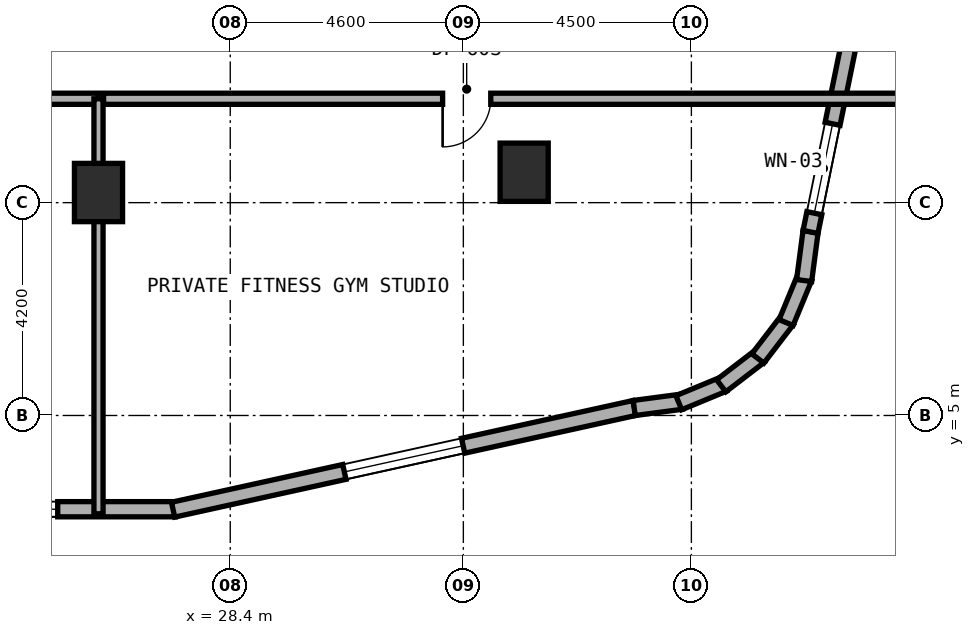
"""IFC4 building model, lengths in metres.
Left out: names, types, materials, properties, quantities, classifications, styles, units other than length and angle.
Written with IfcOpenShell. Run it as: python <this file> out.ifc"""

import sys

from ifc_helpers import new_model, si_unit, direction, frame, frame_2d, origin, origin_2d, place, context, subcontext, project, spatial, rectangle, extrude, element, fill, save


model = new_model("IFC4")
c1 = context("Model", 3, precision=1e-05, world=origin(), true_north=direction((0.0, 1.0)))
c2 = subcontext(c1, "Body", "Model", "MODEL_VIEW")
j1 = project(units=[si_unit("LENGTHUNIT", "METRE"), si_unit("PLANEANGLEUNIT", "RADIAN")], contexts=[c1])
p1 = place(None, origin())
s1 = spatial("IfcSite", under=j1, at=p1, CompositionType="ELEMENT")
p2 = place(p1, origin())
s2 = spatial("IfcBuilding", under=s1, at=p2, CompositionType="ELEMENT")
p3 = place(p2, frame((0.0, 0.0, 69.5)))
s3 = spatial("IfcBuildingStorey", under=s2, at=p3, CompositionType="ELEMENT", Elevation=69.5)
for number, where, z_axis, x_axis in (
    (1, (25.8, 9.4, 0.0), (0.0, 0.0, 1.0), (1.0, 0.0, 0.0)),
    (2, (34.2, 9.8, 0.0), (0.0, 0.0, 1.0), (1.0, 0.0, 0.0)),
):
    element("IfcColumn", number, at=place(p3, frame(where, z_axis=z_axis, x_axis=x_axis)), inside=s3, PredefinedType="COLUMN", context=c2, shape_type="SweptSolid", body=[
        extrude(rectangle(XDim=0.95, YDim=1.15, at=origin_2d()), origin(), (0.0, 0.0, 1.0), 3.5),
    ])
p4 = place(p3, frame((14.727, 3.15, 0.0), z_axis=(0.0, 0.0, 1.0), x_axis=(1.0, 0.0, 0.0)))
e3 = element("IfcWall", 3, at=p4, inside=s3, PredefinedType="STANDARD", context=c2, shape_type="SweptSolid", body=[
    extrude(rectangle(XDim=12.591, YDim=0.3, at=frame_2d((6.295, 0.0))), origin(), (0.0, 0.0, 1.0), 3.22),
])
p5 = place(p4, frame((5.713, 0.0, 0.0)))
e4 = element("IfcOpeningElement", 4, at=p5, cuts=e3, PredefinedType="OPENING", context=c2, shape_type="SweptSolid", body=[
    extrude(rectangle(XDim=1.2, YDim=2.15, at=frame_2d((0.6, 1.075))), frame((0.0, 0.16, 0.0), z_axis=(0.0, -1.0, 0.0), x_axis=(1.0, 0.0, 0.0)), (0.0, 0.0, 1.0), 0.32),
])
p6 = place(p4, frame((2.318, 0.0, 0.8)))
e5 = element("IfcOpeningElement", 5, at=p6, cuts=e3, PredefinedType="OPENING", context=c2, shape_type="SweptSolid", body=[
    extrude(rectangle(XDim=2.4, YDim=1.6, at=frame_2d((1.2, 0.8))), frame((0.0, 0.16, 0.0), z_axis=(0.0, -1.0, 0.0), x_axis=(1.0, 0.0, 0.0)), (0.0, 0.0, 1.0), 0.32),
])
p7 = place(p4, frame((7.868, 0.0, 0.8)))
e6 = element("IfcOpeningElement", 6, at=p7, cuts=e3, PredefinedType="OPENING", context=c2, shape_type="SweptSolid", body=[
    extrude(rectangle(XDim=2.4, YDim=1.6, at=frame_2d((1.2, 0.8))), frame((0.0, 0.16, 0.0), z_axis=(0.0, -1.0, 0.0), x_axis=(1.0, 0.0, 0.0)), (0.0, 0.0, 1.0), 0.32),
])
p8 = place(p3, frame((27.272, 3.141, 0.0), z_axis=(0.0, 0.0, 1.0), x_axis=(0.976555357219, 0.21526642629, 0.0)))
e7 = element("IfcWall", 7, at=p8, inside=s3, PredefinedType="STANDARD", context=c2, shape_type="SweptSolid", body=[
    extrude(rectangle(XDim=9.323, YDim=0.3, at=frame_2d((4.661, 0.0))), origin(), (0.0, 0.0, 1.0), 3.22),
])
p9 = place(p8, frame((3.461, 0.0, 0.8)))
e8 = element("IfcOpeningElement", 8, at=p9, cuts=e7, PredefinedType="OPENING", context=c2, shape_type="SweptSolid", body=[
    extrude(rectangle(XDim=2.4, YDim=1.6, at=frame_2d((1.2, 0.8))), frame((0.0, 0.16, 0.0), z_axis=(0.0, -1.0, 0.0), x_axis=(1.0, 0.0, 0.0)), (0.0, 0.0, 1.0), 0.32),
])
p10 = place(p3, frame((36.372, 5.148, 0.0), z_axis=(0.0, 0.0, 1.0), x_axis=(0.991359246108, 0.131174864804, 0.0)))
e9 = element("IfcWall", 9, at=p10, inside=s3, PredefinedType="STANDARD", context=c2, shape_type="SweptSolid", body=[
    extrude(rectangle(XDim=0.938, YDim=0.3, at=frame_2d((0.469, 0.0))), origin(), (0.0, 0.0, 1.0), 3.22),
])
p11 = place(p3, frame((37.252, 5.252, 0.0), z_axis=(0.0, 0.0, 1.0), x_axis=(0.924019948111, 0.382344263057, 0.0)))
e10 = element("IfcWall", 10, at=p11, inside=s3, PredefinedType="STANDARD", context=c2, shape_type="SweptSolid", body=[
    extrude(rectangle(XDim=0.955, YDim=0.3, at=frame_2d((0.477, 0.0))), origin(), (0.0, 0.0, 1.0), 3.22),
])
p12 = place(p3, frame((38.089, 5.586, 0.0), z_axis=(0.0, 0.0, 1.0), x_axis=(0.793573440799, 0.608474481025, 0.0)))
e11 = element("IfcWall", 11, at=p12, inside=s3, PredefinedType="STANDARD", context=c2, shape_type="SweptSolid", body=[
    extrude(rectangle(XDim=0.955, YDim=0.3, at=frame_2d((0.478, 0.0))), origin(), (0.0, 0.0, 1.0), 3.22),
])
p13 = place(p3, frame((38.812, 6.125, 0.0), z_axis=(0.0, 0.0, 1.0), x_axis=(0.608351047625, 0.793668068435, 0.0)))
e12 = element("IfcWall", 12, at=p13, inside=s3, PredefinedType="STANDARD", context=c2, shape_type="SweptSolid", body=[
    extrude(rectangle(XDim=0.955, YDim=0.3, at=frame_2d((0.478, 0.0))), origin(), (0.0, 0.0, 1.0), 3.22),
])
p14 = place(p3, frame((39.369, 6.834, 0.0), z_axis=(0.0, 0.0, 1.0), x_axis=(0.382344263057, 0.924019948111, 0.0)))
e13 = element("IfcWall", 13, at=p14, inside=s3, PredefinedType="STANDARD", context=c2, shape_type="SweptSolid", body=[
    extrude(rectangle(XDim=0.955, YDim=0.3, at=frame_2d((0.477, 0.0))), origin(), (0.0, 0.0, 1.0), 3.22),
])
p15 = place(p3, frame((39.725, 7.663, 0.0), z_axis=(0.0, 0.0, 1.0), x_axis=(0.130454512571, 0.991454295543, 0.0)))
e14 = element("IfcWall", 14, at=p15, inside=s3, PredefinedType="STANDARD", context=c2, shape_type="SweptSolid", body=[
    extrude(rectangle(XDim=0.973, YDim=0.3, at=frame_2d((0.487, 0.0))), origin(), (0.0, 0.0, 1.0), 3.22),
])
p16 = place(p3, frame((39.851, 8.622, 0.0), z_axis=(0.0, 0.0, 1.0), x_axis=(0.199990901713, 0.979797754249, 0.0)))
e15 = element("IfcWall", 15, at=p16, inside=s3, PredefinedType="STANDARD", context=c2, shape_type="SweptSolid", body=[
    extrude(rectangle(XDim=10.065, YDim=0.3, at=frame_2d((5.033, 0.0))), origin(), (0.0, 0.0, 1.0), 3.22),
])
p17 = place(p16, frame((0.378, 0.0, 0.85)))
e16 = element("IfcOpeningElement", 16, at=p17, cuts=e15, PredefinedType="OPENING", context=c2, shape_type="SweptSolid", body=[
    extrude(rectangle(XDim=1.8, YDim=1.5, at=frame_2d((0.9, 0.75))), frame((0.0, 0.16, 0.0), z_axis=(0.0, -1.0, 0.0), x_axis=(1.0, 0.0, 0.0)), (0.0, 0.0, 1.0), 0.32),
])
p18 = place(p16, frame((5.236, 0.0, 0.8)))
e17 = element("IfcOpeningElement", 17, at=p18, cuts=e15, PredefinedType="OPENING", context=c2, shape_type="SweptSolid", body=[
    extrude(rectangle(XDim=2.4, YDim=1.6, at=frame_2d((1.2, 0.8))), frame((0.0, 0.16, 0.0), z_axis=(0.0, -1.0, 0.0), x_axis=(1.0, 0.0, 0.0)), (0.0, 0.0, 1.0), 0.32),
])
p19 = place(p3, frame((18.4, 11.25, 0.0), z_axis=(0.0, 0.0, 1.0), x_axis=(1.0, 0.0, 0.0)))
e18 = element("IfcWall", 18, at=p19, inside=s3, PredefinedType="SOLIDWALL", context=c2, shape_type="SweptSolid", body=[
    extrude(rectangle(XDim=7.4, YDim=0.22, at=frame_2d((3.7, 0.0))), origin(), (0.0, 0.0, 1.0), 2.495),
])
p20 = place(p19, frame((3.225, 0.0, 0.0)))
e19 = element("IfcOpeningElement", 19, at=p20, cuts=e18, PredefinedType="OPENING", context=c2, shape_type="SweptSolid", body=[
    extrude(rectangle(XDim=0.95, YDim=2.1, at=frame_2d((0.475, 1.05))), frame((0.0, 0.12, 0.0), z_axis=(0.0, -1.0, 0.0), x_axis=(1.0, 0.0, 0.0)), (0.0, 0.0, 1.0), 0.24),
])
p21 = place(p3, frame((25.8, 3.06, 0.0), z_axis=(0.0, 0.0, 1.0), x_axis=(0.0, 1.0, 0.0)))
e20 = element("IfcWall", 20, at=p21, inside=s3, PredefinedType="SOLIDWALL", context=c2, shape_type="SweptSolid", body=[
    extrude(rectangle(XDim=8.19, YDim=0.18, at=frame_2d((4.095, 0.0))), origin(), (0.0, 0.0, 1.0), 2.495),
])
p22 = place(p3, frame((25.9, 11.25, 0.0), z_axis=(0.0, 0.0, 1.0), x_axis=(1.0, 0.0, 0.0)))
e21 = element("IfcWall", 21, at=p22, inside=s3, PredefinedType="SOLIDWALL", context=c2, shape_type="SweptSolid", body=[
    extrude(rectangle(XDim=15.84, YDim=0.22, at=frame_2d((7.92, 0.0))), origin(), (0.0, 0.0, 1.0), 2.495),
])
p23 = place(p22, frame((6.691, 0.0, 0.0)))
e22 = element("IfcOpeningElement", 22, at=p23, cuts=e21, PredefinedType="OPENING", context=c2, shape_type="SweptSolid", body=[
    extrude(rectangle(XDim=0.95, YDim=2.1, at=frame_2d((0.475, 1.05))), frame((0.0, 0.12, 0.0), z_axis=(0.0, -1.0, 0.0), x_axis=(1.0, 0.0, 0.0)), (0.0, 0.0, 1.0), 0.24),
])
p24 = place(p7, origin())
e23 = element("IfcWindow", 23, at=p24, inside=s3, PartitioningType="SINGLE_PANEL", PredefinedType="WINDOW", context=c2, shape_type="SweptSolid", body=[
    extrude(rectangle(XDim=2.4, YDim=1.6, at=frame_2d((1.2, 0.8))), frame((0.0, 0.03, 0.0), z_axis=(0.0, -1.0, 0.0), x_axis=(1.0, 0.0, 0.0)), (0.0, 0.0, 1.0), 0.06),
])
fill(e6, e23)
p25 = place(p9, origin())
e24 = element("IfcWindow", 24, at=p25, inside=s3, PartitioningType="SINGLE_PANEL", PredefinedType="WINDOW", context=c2, shape_type="SweptSolid", body=[
    extrude(rectangle(XDim=2.4, YDim=1.6, at=frame_2d((1.2, 0.8))), frame((0.0, 0.03, 0.0), z_axis=(0.0, -1.0, 0.0), x_axis=(1.0, 0.0, 0.0)), (0.0, 0.0, 1.0), 0.06),
])
fill(e8, e24)
p26 = place(p17, origin())
e25 = element("IfcWindow", 25, at=p26, inside=s3, PartitioningType="SINGLE_PANEL", PredefinedType="WINDOW", context=c2, shape_type="SweptSolid", body=[
    extrude(rectangle(XDim=1.8, YDim=1.5, at=frame_2d((0.9, 0.75))), frame((0.0, 0.03, 0.0), z_axis=(0.0, -1.0, 0.0), x_axis=(1.0, 0.0, 0.0)), (0.0, 0.0, 1.0), 0.06),
])
fill(e16, e25)
p27 = place(p23, frame((0.95, 0.0, 0.0), z_axis=(0.0, 0.0, 1.0), x_axis=(-1.0, 0.0, 0.0)))
e26 = element("IfcDoor", 26, at=p27, inside=s3, OperationType="SINGLE_SWING_RIGHT", PredefinedType="DOOR", context=c2, shape_type="SweptSolid", body=[
    extrude(rectangle(XDim=0.95, YDim=2.1, at=frame_2d((0.475, 1.05))), frame((0.0, 0.025, 0.0), z_axis=(0.0, -1.0, 0.0), x_axis=(1.0, 0.0, 0.0)), (0.0, 0.0, 1.0), 0.05),
])
fill(e22, e26)
save(model, sys.argv[1])
